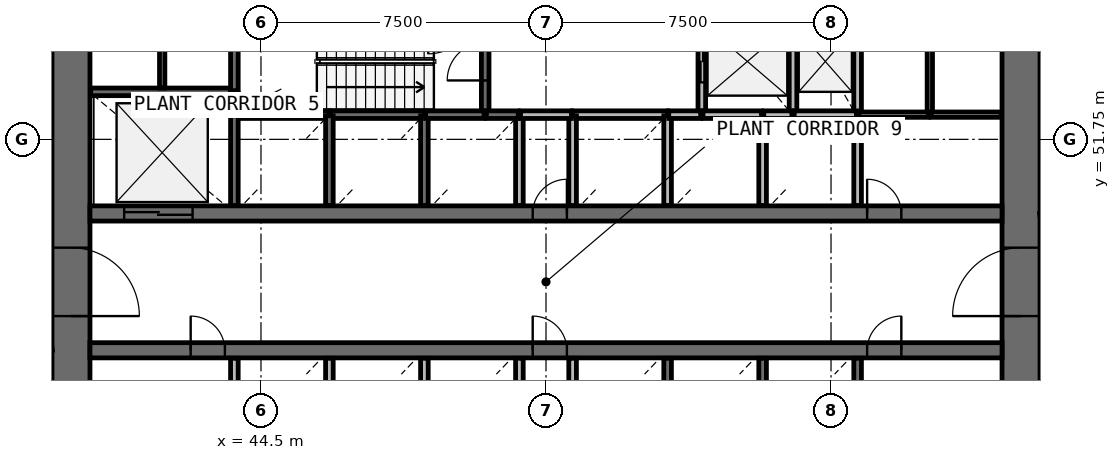
"""IFC4 building model, lengths in metres.
Left out: names, types, materials, properties, quantities, classifications, styles, units other than length and angle.
Written with IfcOpenShell. Run it as: python <this file> out.ifc"""

import sys

from ifc_helpers import new_model, si_unit, direction, frame, frame_2d, origin, place, context, subcontext, project, spatial, rectangle, extrude, source, transform, mapped, element, fill, save


model = new_model("IFC4")
c1 = context("Model", 3, precision=1e-05, world=origin(), true_north=direction((0.0, 1.0)))
c2 = subcontext(c1, "Body", "Model", "MODEL_VIEW")
j1 = project(units=[si_unit("LENGTHUNIT", "METRE"), si_unit("PLANEANGLEUNIT", "RADIAN")], contexts=[c1])
p1 = place(None, origin())
s1 = spatial("IfcSite", under=j1, at=p1, CompositionType="ELEMENT")
p2 = place(p1, origin())
s2 = spatial("IfcBuilding", under=s1, at=p2, CompositionType="ELEMENT")
p3 = place(p2, frame((0.0, 0.0, 75.4)))
s3 = spatial("IfcBuildingStorey", under=s2, at=p3, CompositionType="ELEMENT", Elevation=75.4)
p4 = place(p3, frame((64.5, 38.0, 0.0), z_axis=(0.0, 0.0, 1.0), x_axis=(0.0, 1.0, 0.0)))
e1 = element("IfcWall", 1, at=p4, inside=s3, PredefinedType="SHEAR", context=c2, shape_type="SweptSolid", body=[
    extrude(rectangle(XDim=20.0, YDim=1.0, at=frame_2d((10.0, 0.0))), origin(), (0.0, 0.0, 1.0), 4.4),
])
p5 = place(p4, frame((9.1, 0.0, 0.0)))
e2 = element("IfcOpeningElement", 2, at=p5, cuts=e1, PredefinedType="OPENING", context=c2, shape_type="SweptSolid", body=[
    extrude(rectangle(XDim=1.8, YDim=2.1, at=frame_2d((0.9, 1.05))), frame((0.0, 0.51, 0.0), z_axis=(0.0, -1.0, 0.0), x_axis=(1.0, 0.0, 0.0)), (0.0, 0.0, 1.0), 1.02),
])
p6 = place(p3, frame((39.5, 58.0, 0.0), z_axis=(0.0, 0.0, 1.0), x_axis=(0.0, -1.0, 0.0)))
e3 = element("IfcWall", 3, at=p6, inside=s3, PredefinedType="SHEAR", context=c2, shape_type="SweptSolid", body=[
    extrude(rectangle(XDim=20.0, YDim=1.0, at=frame_2d((10.0, 0.0))), origin(), (0.0, 0.0, 1.0), 4.4),
])
p7 = place(p6, frame((9.1, 0.0, 0.0)))
e4 = element("IfcOpeningElement", 4, at=p7, cuts=e3, PredefinedType="OPENING", context=c2, shape_type="SweptSolid", body=[
    extrude(rectangle(XDim=1.8, YDim=2.1, at=frame_2d((0.9, 1.05))), frame((0.0, 0.51, 0.0), z_axis=(0.0, -1.0, 0.0), x_axis=(1.0, 0.0, 0.0)), (0.0, 0.0, 1.0), 1.02),
])
p8 = place(p3, frame((40.0, 49.8, 0.0), z_axis=(0.0, 0.0, 1.0), x_axis=(1.0, 0.0, 0.0)))
e5 = element("IfcWall", 5, at=p8, inside=s3, PredefinedType="SHEAR", context=c2, shape_type="SweptSolid", body=[
    extrude(rectangle(XDim=24.0, YDim=0.4, at=frame_2d((12.0, 0.0))), origin(), (0.0, 0.0, 1.0), 4.4),
])
p9 = place(p8, frame((0.9, 0.0, 0.0)))
e6 = element("IfcOpeningElement", 6, at=p9, cuts=e5, PredefinedType="OPENING", context=c2, shape_type="SweptSolid", body=[
    extrude(rectangle(XDim=1.8, YDim=2.4, at=frame_2d((0.9, 1.2))), frame((0.0, 0.21, 0.0), z_axis=(0.0, -1.0, 0.0), x_axis=(1.0, 0.0, 0.0)), (0.0, 0.0, 1.0), 0.42),
])
p10 = place(p8, frame((20.45, 0.0, 0.0)))
e7 = element("IfcOpeningElement", 7, at=p10, cuts=e5, PredefinedType="OPENING", context=c2, shape_type="SweptSolid", body=[
    extrude(rectangle(XDim=0.9, YDim=2.1, at=frame_2d((0.45, 1.05))), frame((0.0, 0.21, 0.0), z_axis=(0.0, -1.0, 0.0), x_axis=(1.0, 0.0, 0.0)), (0.0, 0.0, 1.0), 0.42),
])
p11 = place(p8, frame((11.65, 0.0, 0.0)))
e8 = element("IfcOpeningElement", 8, at=p11, cuts=e5, PredefinedType="OPENING", context=c2, shape_type="SweptSolid", body=[
    extrude(rectangle(XDim=0.9, YDim=2.1, at=frame_2d((0.45, 1.05))), frame((0.0, 0.21, 0.0), z_axis=(0.0, -1.0, 0.0), x_axis=(1.0, 0.0, 0.0)), (0.0, 0.0, 1.0), 0.42),
])
p12 = place(p3, frame((40.0, 46.2, 0.0), z_axis=(0.0, 0.0, 1.0), x_axis=(1.0, 0.0, 0.0)))
e9 = element("IfcWall", 9, at=p12, inside=s3, PredefinedType="SHEAR", context=c2, shape_type="SweptSolid", body=[
    extrude(rectangle(XDim=24.0, YDim=0.4, at=frame_2d((12.0, 0.0))), origin(), (0.0, 0.0, 1.0), 4.4),
])
p13 = place(p12, frame((20.45, 0.0, 0.0)))
e10 = element("IfcOpeningElement", 10, at=p13, cuts=e9, PredefinedType="OPENING", context=c2, shape_type="SweptSolid", body=[
    extrude(rectangle(XDim=0.9, YDim=2.1, at=frame_2d((0.45, 1.05))), frame((0.0, 0.21, 0.0), z_axis=(0.0, -1.0, 0.0), x_axis=(1.0, 0.0, 0.0)), (0.0, 0.0, 1.0), 0.42),
])
p14 = place(p12, frame((2.65, 0.0, 0.0)))
e11 = element("IfcOpeningElement", 11, at=p14, cuts=e9, PredefinedType="OPENING", context=c2, shape_type="SweptSolid", body=[
    extrude(rectangle(XDim=0.9, YDim=2.1, at=frame_2d((0.45, 1.05))), frame((0.0, 0.21, 0.0), z_axis=(0.0, -1.0, 0.0), x_axis=(1.0, 0.0, 0.0)), (0.0, 0.0, 1.0), 0.42),
])
p15 = place(p12, frame((11.65, 0.0, 0.0)))
e12 = element("IfcOpeningElement", 12, at=p15, cuts=e9, PredefinedType="OPENING", context=c2, shape_type="SweptSolid", body=[
    extrude(rectangle(XDim=0.9, YDim=2.1, at=frame_2d((0.45, 1.05))), frame((0.0, 0.21, 0.0), z_axis=(0.0, -1.0, 0.0), x_axis=(1.0, 0.0, 0.0)), (0.0, 0.0, 1.0), 0.42),
])
p16 = place(p3, frame((43.8, 53.0, 0.0), z_axis=(0.0, 0.0, 1.0), x_axis=(-1.0, 0.0, 0.0)))
e13 = element("IfcWall", 13, at=p16, inside=s3, PredefinedType="SOLIDWALL", context=c2, shape_type="SweptSolid", body=[
    extrude(rectangle(XDim=3.78, YDim=0.2, at=frame_2d((1.89, 0.0))), origin(), (0.0, 0.0, 1.0), 4.0),
])
p17 = place(p3, frame((50.4, 52.4, 0.0), z_axis=(0.0, 0.0, 1.0), x_axis=(0.0, 1.0, 0.0)))
e14 = element("IfcWall", 14, at=p17, inside=s3, PredefinedType="SOLIDWALL", context=c2, shape_type="SweptSolid", body=[
    extrude(rectangle(XDim=2.77, YDim=0.2, at=frame_2d((1.385, 0.0))), origin(), (0.0, 0.0, 1.0), 4.0),
])
p18 = place(p17, frame((0.9, 0.0, 0.0)))
e15 = element("IfcOpeningElement", 15, at=p18, cuts=e14, PredefinedType="OPENING", context=c2, shape_type="SweptSolid", body=[
    extrude(rectangle(XDim=1.0, YDim=2.1, at=frame_2d((0.5, 1.05))), frame((0.0, 0.11, 0.0), z_axis=(0.0, -1.0, 0.0), x_axis=(1.0, 0.0, 0.0)), (0.0, 0.0, 1.0), 0.22),
])
p19 = place(p3, frame((56.1, 55.17, 0.0), z_axis=(0.0, 0.0, 1.0), x_axis=(0.0, -1.0, 0.0)))
e16 = element("IfcWall", 16, at=p19, inside=s3, PredefinedType="SOLIDWALL", context=c2, shape_type="SweptSolid", body=[
    extrude(rectangle(XDim=2.77, YDim=0.2, at=frame_2d((1.385, 0.0))), origin(), (0.0, 0.0, 1.0), 4.0),
])
p20 = place(p19, frame((0.82, 0.0, 0.0)))
e17 = element("IfcOpeningElement", 17, at=p20, cuts=e16, PredefinedType="OPENING", context=c2, shape_type="SweptSolid", body=[
    extrude(rectangle(XDim=1.1, YDim=2.1, at=frame_2d((0.55, 1.05))), frame((0.0, 0.11, 0.0), z_axis=(0.0, -1.0, 0.0), x_axis=(1.0, 0.0, 0.0)), (0.0, 0.0, 1.0), 0.22),
])
for number, where, z_axis, x_axis in (
    (18, (58.5, 52.4, 0.0), (0.0, 0.0, 1.0), (0.0, 1.0, 0.0)),
    (19, (60.2, 52.4, 0.0), (0.0, 0.0, 1.0), (0.0, 1.0, 0.0)),
):
    element("IfcWall", number, at=place(p3, frame(where, z_axis=z_axis, x_axis=x_axis)), inside=s3, PredefinedType="SOLIDWALL", context=c2, shape_type="SweptSolid", body=[
        extrude(rectangle(XDim=2.8, YDim=0.2, at=frame_2d((1.4, 0.0))), origin(), (0.0, 0.0, 1.0), 4.0),
    ])
p21 = place(p3, frame((46.3, 52.4, 0.0), z_axis=(0.0, 0.0, 1.0), x_axis=(-1.0, 0.0, 0.0)))
e20 = element("IfcWall", 20, at=p21, inside=s3, PredefinedType="SOLIDWALL", context=c2, shape_type="SweptSolid", body=[
    extrude(rectangle(XDim=2.5, YDim=0.2, at=frame_2d((1.25, 0.0))), origin(), (0.0, 0.0, 1.0), 4.0),
])
p22 = place(p3, frame((48.8, 52.4, 0.0), z_axis=(0.0, 0.0, 1.0), x_axis=(-1.0, 0.0, 0.0)))
e21 = element("IfcWall", 21, at=p22, inside=s3, PredefinedType="SOLIDWALL", context=c2, shape_type="SweptSolid", body=[
    extrude(rectangle(XDim=2.47, YDim=0.2, at=frame_2d((1.235, 0.0))), origin(), (0.0, 0.0, 1.0), 4.0),
])
p23 = place(p3, frame((55.2, 52.4, 0.0), z_axis=(0.0, 0.0, 1.0), x_axis=(-1.0, 0.0, 0.0)))
e22 = element("IfcWall", 22, at=p23, inside=s3, PredefinedType="SOLIDWALL", context=c2, shape_type="SweptSolid", body=[
    extrude(rectangle(XDim=2.5, YDim=0.2, at=frame_2d((1.25, 0.0))), origin(), (0.0, 0.0, 1.0), 4.0),
])
for number, where, z_axis, x_axis in (
    (23, (43.8, 45.99, 0.0), (0.0, 0.0, 1.0), (0.0, -1.0, 0.0)),
    (24, (43.8, 52.37, 0.0), (0.0, 0.0, 1.0), (0.0, -1.0, 0.0)),
):
    element("IfcWall", number, at=place(p3, frame(where, z_axis=z_axis, x_axis=x_axis)), inside=s3, PredefinedType="SOLIDWALL", context=c2, shape_type="SweptSolid", body=[
        extrude(rectangle(XDim=2.36, YDim=0.2, at=frame_2d((1.18, 0.0))), origin(), (0.0, 0.0, 1.0), 4.0),
    ])
p24 = place(p3, frame((46.3, 43.6, 0.0), z_axis=(0.0, 0.0, 1.0), x_axis=(0.0, 1.0, 0.0)))
e25 = element("IfcWall", 25, at=p24, inside=s3, PredefinedType="SOLIDWALL", context=c2, shape_type="SweptSolid", body=[
    extrude(rectangle(XDim=2.39, YDim=0.2, at=frame_2d((1.195, 0.0))), origin(), (0.0, 0.0, 1.0), 4.0),
])
for number, where, z_axis, x_axis in (
    (26, (46.3, 50.01, 0.0), (0.0, 0.0, 1.0), (0.0, 1.0, 0.0)),
    (27, (48.8, 43.63, 0.0), (0.0, 0.0, 1.0), (0.0, 1.0, 0.0)),
    (28, (48.8, 50.01, 0.0), (0.0, 0.0, 1.0), (0.0, 1.0, 0.0)),
    (29, (51.3, 43.63, 0.0), (0.0, 0.0, 1.0), (0.0, 1.0, 0.0)),
):
    element("IfcWall", number, at=place(p3, frame(where, z_axis=z_axis, x_axis=x_axis)), inside=s3, PredefinedType="SOLIDWALL", context=c2, shape_type="SweptSolid", body=[
        extrude(rectangle(XDim=2.36, YDim=0.2, at=frame_2d((1.18, 0.0))), origin(), (0.0, 0.0, 1.0), 4.0),
    ])
for number, where, z_axis, x_axis in (
    (30, (51.3, 50.01, 0.0), (0.0, 0.0, 1.0), (0.0, 1.0, 0.0)),
    (31, (52.7, 45.99, 0.0), (0.0, 0.0, 1.0), (0.0, -1.0, 0.0)),
):
    element("IfcWall", number, at=place(p3, frame(where, z_axis=z_axis, x_axis=x_axis)), inside=s3, PredefinedType="SOLIDWALL", context=c2, shape_type="SweptSolid", body=[
        extrude(rectangle(XDim=2.39, YDim=0.2, at=frame_2d((1.195, 0.0))), origin(), (0.0, 0.0, 1.0), 4.0),
    ])
for number, where, z_axis, x_axis in (
    (32, (52.7, 52.37, 0.0), (0.0, 0.0, 1.0), (0.0, -1.0, 0.0)),
    (33, (55.2, 43.63, 0.0), (0.0, 0.0, 1.0), (0.0, 1.0, 0.0)),
    (34, (55.2, 50.01, 0.0), (0.0, 0.0, 1.0), (0.0, 1.0, 0.0)),
    (35, (57.7, 43.63, 0.0), (0.0, 0.0, 1.0), (0.0, 1.0, 0.0)),
):
    element("IfcWall", number, at=place(p3, frame(where, z_axis=z_axis, x_axis=x_axis)), inside=s3, PredefinedType="SOLIDWALL", context=c2, shape_type="SweptSolid", body=[
        extrude(rectangle(XDim=2.36, YDim=0.2, at=frame_2d((1.18, 0.0))), origin(), (0.0, 0.0, 1.0), 4.0),
    ])
p25 = place(p3, frame((57.7, 50.01, 0.0), z_axis=(0.0, 0.0, 1.0), x_axis=(0.0, 1.0, 0.0)))
e36 = element("IfcWall", 36, at=p25, inside=s3, PredefinedType="SOLIDWALL", context=c2, shape_type="SweptSolid", body=[
    extrude(rectangle(XDim=2.39, YDim=0.2, at=frame_2d((1.195, 0.0))), origin(), (0.0, 0.0, 1.0), 4.0),
])
for number, where, z_axis, x_axis in (
    (37, (60.2, 43.63, 0.0), (0.0, 0.0, 1.0), (0.0, 1.0, 0.0)),
    (38, (60.2, 50.01, 0.0), (0.0, 0.0, 1.0), (0.0, 1.0, 0.0)),
):
    element("IfcWall", number, at=place(p3, frame(where, z_axis=z_axis, x_axis=x_axis)), inside=s3, PredefinedType="SOLIDWALL", context=c2, shape_type="SweptSolid", body=[
        extrude(rectangle(XDim=2.36, YDim=0.2, at=frame_2d((1.18, 0.0))), origin(), (0.0, 0.0, 1.0), 4.0),
    ])
p26 = place(p3, frame((43.8, 55.17, 0.0), z_axis=(0.0, 0.0, 1.0), x_axis=(0.0, -1.0, 0.0)))
e39 = element("IfcWall", 39, at=p26, inside=s3, PredefinedType="SOLIDWALL", context=c2, shape_type="SweptSolid", body=[
    extrude(rectangle(XDim=2.14, YDim=0.2, at=frame_2d((1.07, 0.0))), origin(), (0.0, 0.0, 1.0), 4.0),
])
p27 = place(p3, frame((60.17, 52.4, 0.0), z_axis=(0.0, 0.0, 1.0), x_axis=(-1.0, 0.0, 0.0)))
e40 = element("IfcWall", 40, at=p27, inside=s3, PredefinedType="SOLIDWALL", context=c2, shape_type="SweptSolid", body=[
    extrude(rectangle(XDim=1.64, YDim=0.2, at=frame_2d((0.82, 0.0))), origin(), (0.0, 0.0, 1.0), 4.0),
])
for number, where, z_axis, x_axis in (
    (41, (50.37, 52.4, 0.0), (0.0, 0.0, 1.0), (-1.0, 0.0, 0.0)),
    (42, (57.67, 52.4, 0.0), (0.0, 0.0, 1.0), (-1.0, 0.0, 0.0)),
):
    element("IfcWall", number, at=place(p3, frame(where, z_axis=z_axis, x_axis=x_axis)), inside=s3, PredefinedType="SOLIDWALL", context=c2, shape_type="SweptSolid", body=[
        extrude(rectangle(XDim=1.54, YDim=0.2, at=frame_2d((0.77, 0.0))), origin(), (0.0, 0.0, 1.0), 4.0),
    ])
p28 = place(p3, frame((51.33, 52.4, 0.0), z_axis=(0.0, 0.0, 1.0), x_axis=(1.0, 0.0, 0.0)))
e43 = element("IfcWall", 43, at=p28, inside=s3, PredefinedType="SOLIDWALL", context=c2, shape_type="SweptSolid", body=[
    extrude(rectangle(XDim=1.34, YDim=0.2, at=frame_2d((0.67, 0.0))), origin(), (0.0, 0.0, 1.0), 4.0),
])
for number, where, z_axis, x_axis in (
    (44, (51.27, 52.4, 0.0), (0.0, 0.0, 1.0), (-1.0, 0.0, 0.0)),
    (45, (56.07, 52.4, 0.0), (0.0, 0.0, 1.0), (-1.0, 0.0, 0.0)),
):
    element("IfcWall", number, at=place(p3, frame(where, z_axis=z_axis, x_axis=x_axis)), inside=s3, PredefinedType="SOLIDWALL", context=c2, shape_type="SweptSolid", body=[
        extrude(rectangle(XDim=0.84, YDim=0.2, at=frame_2d((0.42, 0.0))), origin(), (0.0, 0.0, 1.0), 4.0),
    ])
p29 = place(p3, frame((58.47, 52.4, 0.0), z_axis=(0.0, 0.0, 1.0), x_axis=(-1.0, 0.0, 0.0)))
e46 = element("IfcWall", 46, at=p29, inside=s3, PredefinedType="SOLIDWALL", context=c2, shape_type="SweptSolid", body=[
    extrude(rectangle(XDim=0.74, YDim=0.2, at=frame_2d((0.37, 0.0))), origin(), (0.0, 0.0, 1.0), 4.0),
])
p30 = place(p3, frame((43.8, 52.43, 0.0), z_axis=(0.0, 0.0, 1.0), x_axis=(0.0, 1.0, 0.0)))
e47 = element("IfcWall", 47, at=p30, inside=s3, PredefinedType="SOLIDWALL", context=c2, shape_type="SweptSolid", body=[
    extrude(rectangle(XDim=0.54, YDim=0.2, at=frame_2d((0.27, 0.0))), origin(), (0.0, 0.0, 1.0), 4.0),
])
p31 = place(p3, frame((67.31, 50.016, 0.0), z_axis=(0.0, 0.0, 1.0), x_axis=(-0.991440737811, -0.130557509967, 0.0)))
e48 = element("IfcWall", 48, at=p31, inside=s3, PredefinedType="PARTITIONING", context=c2, shape_type="SweptSolid", body=[
    extrude(rectangle(XDim=2.33, YDim=0.18, at=frame_2d((1.165, 0.0))), origin(), (0.0, 0.0, 1.0), 2.8),
])
p32 = place(p31, frame((0.48, 0.0, 0.0)))
e49 = element("IfcOpeningElement", 49, at=p32, cuts=e48, PredefinedType="OPENING", context=c2, shape_type="SweptSolid", body=[
    extrude(rectangle(XDim=1.2, YDim=2.1, at=frame_2d((0.6, 1.05))), frame((0.0, 0.1, 0.0), z_axis=(0.0, -1.0, 0.0), x_axis=(1.0, 0.0, 0.0)), (0.0, 0.0, 1.0), 0.2),
])
p33 = place(p3, frame((36.69, 45.984, 0.0), z_axis=(0.0, 0.0, 1.0), x_axis=(0.991440737811, 0.130557509967, 0.0)))
e50 = element("IfcWall", 50, at=p33, inside=s3, PredefinedType="PARTITIONING", context=c2, shape_type="SweptSolid", body=[
    extrude(rectangle(XDim=2.33, YDim=0.18, at=frame_2d((1.165, 0.0))), origin(), (0.0, 0.0, 1.0), 2.8),
])
p34 = place(p33, frame((0.48, 0.0, 0.0)))
e51 = element("IfcOpeningElement", 51, at=p34, cuts=e50, PredefinedType="OPENING", context=c2, shape_type="SweptSolid", body=[
    extrude(rectangle(XDim=1.2, YDim=2.1, at=frame_2d((0.6, 1.05))), frame((0.0, 0.1, 0.0), z_axis=(0.0, -1.0, 0.0), x_axis=(1.0, 0.0, 0.0)), (0.0, 0.0, 1.0), 0.2),
])
p35 = place(p3, frame((62.1, 52.4, 0.0), z_axis=(0.0, 0.0, 1.0), x_axis=(0.0, 1.0, 0.0)))
e52 = element("IfcWall", 52, at=p35, inside=s3, PredefinedType="PARTITIONING", context=c2, shape_type="SweptSolid", body=[
    extrude(rectangle(XDim=2.71, YDim=0.14, at=frame_2d((1.355, 0.0))), origin(), (0.0, 0.0, 1.0), 3.1),
])
p36 = place(p3, frame((41.9, 53.1, 0.0), z_axis=(0.0, 0.0, 1.0), x_axis=(0.0, 1.0, 0.0)))
e53 = element("IfcWall", 53, at=p36, inside=s3, PredefinedType="PARTITIONING", context=c2, shape_type="SweptSolid", body=[
    extrude(rectangle(XDim=2.01, YDim=0.14, at=frame_2d((1.005, 0.0))), origin(), (0.0, 0.0, 1.0), 3.1),
])
p37 = place(p3, frame((62.07, 52.4, 0.0), z_axis=(0.0, 0.0, 1.0), x_axis=(-1.0, 0.0, 0.0)))
e54 = element("IfcWall", 54, at=p37, inside=s3, PredefinedType="PARTITIONING", context=c2, shape_type="SweptSolid", body=[
    extrude(rectangle(XDim=1.84, YDim=0.14, at=frame_2d((0.92, 0.0))), origin(), (0.0, 0.0, 1.0), 3.1),
])
p38 = place(p3, frame((63.98, 52.4, 0.0), z_axis=(0.0, 0.0, 1.0), x_axis=(-1.0, 0.0, 0.0)))
e55 = element("IfcWall", 55, at=p38, inside=s3, PredefinedType="PARTITIONING", context=c2, shape_type="SweptSolid", body=[
    extrude(rectangle(XDim=1.85, YDim=0.14, at=frame_2d((0.925, 0.0))), origin(), (0.0, 0.0, 1.0), 3.1),
])
m1 = source(origin(), c2, "Body", "SweptSolid", [
    extrude(rectangle(XDim=1.8, YDim=2.1, at=frame_2d((0.9, 1.05))), frame((0.0, 0.025, 0.0), z_axis=(0.0, -1.0, 0.0), x_axis=(1.0, 0.0, 0.0)), (0.0, 0.0, 1.0), 0.05),
])
p39 = place(p7, origin())
e56 = element("IfcDoor", 56, at=p39, inside=s3, OperationType="SINGLE_SWING_RIGHT", PredefinedType="DOOR", context=c2, shape_type="MappedRepresentation", body=[
    mapped(m1, transform((0.0, 0.0, 0.0), scale=1.0)),
])
fill(e4, e56)
p40 = place(p5, origin())
e57 = element("IfcDoor", 57, at=p40, inside=s3, OperationType="SINGLE_SWING_LEFT", PredefinedType="DOOR", context=c2, shape_type="MappedRepresentation", body=[
    mapped(m1, transform((0.0, 0.0, 0.0), scale=1.0)),
])
fill(e2, e57)
m2 = source(origin(), c2, "Body", "SweptSolid", [
    extrude(rectangle(XDim=1.1, YDim=2.1, at=frame_2d((0.55, 1.05))), frame((0.0, 0.025, 0.0), z_axis=(0.0, -1.0, 0.0), x_axis=(1.0, 0.0, 0.0)), (0.0, 0.0, 1.0), 0.05),
])
p41 = place(p20, origin())
e58 = element("IfcDoor", 58, at=p41, inside=s3, OperationType="DOUBLE_DOOR_SLIDING", PredefinedType="USERDEFINED", context=c2, shape_type="MappedRepresentation", body=[
    mapped(m2, transform((0.0, 0.0, 0.0), scale=1.0)),
])
fill(e17, e58)
m3 = source(origin(), c2, "Body", "SweptSolid", [
    extrude(rectangle(XDim=1.8, YDim=2.4, at=frame_2d((0.9, 1.2))), frame((0.0, 0.025, 0.0), z_axis=(0.0, -1.0, 0.0), x_axis=(1.0, 0.0, 0.0)), (0.0, 0.0, 1.0), 0.05),
])
p42 = place(p9, origin())
e59 = element("IfcDoor", 59, at=p42, inside=s3, OperationType="DOUBLE_DOOR_SLIDING", PredefinedType="USERDEFINED", context=c2, shape_type="MappedRepresentation", body=[
    mapped(m3, transform((0.0, 0.0, 0.0), scale=1.0)),
])
fill(e6, e59)
m4 = source(origin(), c2, "Body", "SweptSolid", [
    extrude(rectangle(XDim=1.0, YDim=2.1, at=frame_2d((0.5, 1.05))), frame((0.0, 0.025, 0.0), z_axis=(0.0, -1.0, 0.0), x_axis=(1.0, 0.0, 0.0)), (0.0, 0.0, 1.0), 0.05),
])
p43 = place(p18, origin())
e60 = element("IfcDoor", 60, at=p43, inside=s3, OperationType="SINGLE_SWING_LEFT", PredefinedType="DOOR", context=c2, shape_type="MappedRepresentation", body=[
    mapped(m4, transform((0.0, 0.0, 0.0), scale=1.0)),
])
fill(e15, e60)
m5 = source(origin(), c2, "Body", "SweptSolid", [
    extrude(rectangle(XDim=0.9, YDim=2.1, at=frame_2d((0.45, 1.05))), frame((0.0, 0.025, 0.0), z_axis=(0.0, -1.0, 0.0), x_axis=(1.0, 0.0, 0.0)), (0.0, 0.0, 1.0), 0.05),
])
p44 = place(p13, origin())
e61 = element("IfcDoor", 61, at=p44, inside=s3, OperationType="SINGLE_SWING_RIGHT", PredefinedType="DOOR", context=c2, shape_type="MappedRepresentation", body=[
    mapped(m5, transform((0.0, 0.0, 0.0), scale=1.0)),
])
fill(e10, e61)
p45 = place(p10, origin())
e62 = element("IfcDoor", 62, at=p45, inside=s3, OperationType="SINGLE_SWING_LEFT", PredefinedType="DOOR", context=c2, shape_type="MappedRepresentation", body=[
    mapped(m5, transform((0.0, 0.0, 0.0), scale=1.0)),
])
fill(e7, e62)
p46 = place(p14, origin())
e63 = element("IfcDoor", 63, at=p46, inside=s3, OperationType="SINGLE_SWING_LEFT", PredefinedType="DOOR", context=c2, shape_type="MappedRepresentation", body=[
    mapped(m5, transform((0.0, 0.0, 0.0), scale=1.0)),
])
fill(e11, e63)
p47 = place(p11, origin())
e64 = element("IfcDoor", 64, at=p47, inside=s3, OperationType="SINGLE_SWING_RIGHT", PredefinedType="DOOR", context=c2, shape_type="MappedRepresentation", body=[
    mapped(m5, transform((0.0, 0.0, 0.0), scale=1.0)),
])
fill(e8, e64)
p48 = place(p15, origin())
e65 = element("IfcDoor", 65, at=p48, inside=s3, OperationType="SINGLE_SWING_LEFT", PredefinedType="DOOR", context=c2, shape_type="MappedRepresentation", body=[
    mapped(m5, transform((0.0, 0.0, 0.0), scale=1.0)),
])
fill(e12, e65)
save(model, sys.argv[1])
